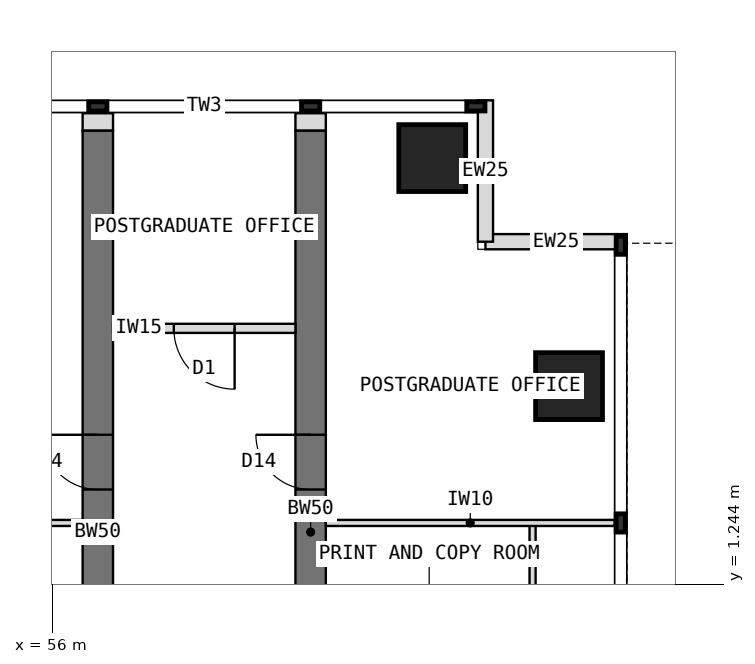
"""IFC4 building model, lengths in metres.
Left out: names, types, materials, properties, quantities, classifications, styles, units other than length and angle.
Written with IfcOpenShell. Run it as: python <this file> out.ifc"""

import sys

from ifc_helpers import new_model, si_unit, direction, frame, frame_2d, origin, origin_2d, place, context, subcontext, project, spatial, rectangle, extrude, element, fill, save


model = new_model("IFC4")
c1 = context("Model", 3, precision=1e-05, world=origin(), true_north=direction((0.0, 1.0)))
c2 = subcontext(c1, "Body", "Model", "MODEL_VIEW")
j1 = project(units=[si_unit("LENGTHUNIT", "METRE"), si_unit("PLANEANGLEUNIT", "RADIAN")], contexts=[c1])
p1 = place(None, origin())
s1 = spatial("IfcSite", under=j1, at=p1, CompositionType="ELEMENT")
p2 = place(p1, origin())
s2 = spatial("IfcBuilding", under=s1, at=p2, CompositionType="ELEMENT")
p3 = place(p2, frame((0.0, 0.0, 234.5)))
s3 = spatial("IfcBuildingStorey", under=s2, at=p3, CompositionType="ELEMENT", Elevation=234.5)
p4 = place(p3, frame((56.75, -4.5, 0.0), z_axis=(0.0, 0.0, 1.0), x_axis=(0.0, 1.0, 0.0)))
e1 = element("IfcWall", 1, at=p4, inside=s3, PredefinedType="SHEAR", context=c2, shape_type="SweptSolid", body=[
    extrude(rectangle(XDim=13.2, YDim=0.5, at=frame_2d((6.6, 0.0))), origin(), (0.0, 0.0, 1.0), 4.0),
])
p5 = place(p4, frame((0.55, 0.0, 0.0)))
e2 = element("IfcOpeningElement", 2, at=p5, cuts=e1, PredefinedType="OPENING", context=c2, shape_type="SweptSolid", body=[
    extrude(rectangle(XDim=0.9, YDim=2.1, at=frame_2d((0.45, 1.05))), frame((0.0, 0.26, 0.0), z_axis=(0.0, -1.0, 0.0), x_axis=(1.0, 0.0, 0.0)), (0.0, 0.0, 1.0), 0.52),
])
p6 = place(p4, frame((2.8, 0.0, 0.0)))
e3 = element("IfcOpeningElement", 3, at=p6, cuts=e1, PredefinedType="OPENING", context=c2, shape_type="SweptSolid", body=[
    extrude(rectangle(XDim=0.9, YDim=2.1, at=frame_2d((0.45, 1.05))), frame((0.0, 0.26, 0.0), z_axis=(0.0, -1.0, 0.0), x_axis=(1.0, 0.0, 0.0)), (0.0, 0.0, 1.0), 0.52),
])
p7 = place(p4, frame((7.3, 0.0, 0.0)))
e4 = element("IfcOpeningElement", 4, at=p7, cuts=e1, PredefinedType="OPENING", context=c2, shape_type="SweptSolid", body=[
    extrude(rectangle(XDim=0.9, YDim=2.1, at=frame_2d((0.45, 1.05))), frame((0.0, 0.26, 0.0), z_axis=(0.0, -1.0, 0.0), x_axis=(1.0, 0.0, 0.0)), (0.0, 0.0, 1.0), 0.52),
])
p8 = place(p3, frame((60.25, -4.5, 0.0), z_axis=(0.0, 0.0, 1.0), x_axis=(0.0, 1.0, 0.0)))
e5 = element("IfcWall", 5, at=p8, inside=s3, PredefinedType="SHEAR", context=c2, shape_type="SweptSolid", body=[
    extrude(rectangle(XDim=13.2, YDim=0.5, at=frame_2d((6.6, 0.0))), origin(), (0.0, 0.0, 1.0), 4.0),
])
p9 = place(p8, frame((0.55, 0.0, 0.0)))
e6 = element("IfcOpeningElement", 6, at=p9, cuts=e5, PredefinedType="OPENING", context=c2, shape_type="SweptSolid", body=[
    extrude(rectangle(XDim=0.9, YDim=2.1, at=frame_2d((0.45, 1.05))), frame((0.0, 0.26, 0.0), z_axis=(0.0, -1.0, 0.0), x_axis=(1.0, 0.0, 0.0)), (0.0, 0.0, 1.0), 0.52),
])
p10 = place(p8, frame((2.8, 0.0, 0.0)))
e7 = element("IfcOpeningElement", 7, at=p10, cuts=e5, PredefinedType="OPENING", context=c2, shape_type="SweptSolid", body=[
    extrude(rectangle(XDim=0.9, YDim=2.1, at=frame_2d((0.45, 1.05))), frame((0.0, 0.26, 0.0), z_axis=(0.0, -1.0, 0.0), x_axis=(1.0, 0.0, 0.0)), (0.0, 0.0, 1.0), 0.52),
])
p11 = place(p8, frame((7.3, 0.0, 0.0)))
e8 = element("IfcOpeningElement", 8, at=p11, cuts=e5, PredefinedType="OPENING", context=c2, shape_type="SweptSolid", body=[
    extrude(rectangle(XDim=0.9, YDim=2.1, at=frame_2d((0.45, 1.05))), frame((0.0, 0.26, 0.0), z_axis=(0.0, -1.0, 0.0), x_axis=(1.0, 0.0, 0.0)), (0.0, 0.0, 1.0), 0.52),
])
for number, where, z_axis, x_axis in (
    (9, (64.5, 4.5, 0.0), (0.0, 0.0, 1.0), (1.0, 0.0, 0.0)),
    (10, (62.25, 8.25, 0.0), (0.0, 0.0, 1.0), (1.0, 0.0, 0.0)),
):
    element("IfcColumn", number, at=place(p3, frame(where, z_axis=z_axis, x_axis=x_axis)), inside=s3, PredefinedType="COLUMN", context=c2, shape_type="SweptSolid", body=[
        extrude(rectangle(XDim=1.1, YDim=1.1, at=origin_2d()), origin(), (0.0, 0.0, 1.0), 4.0),
    ])
for number, where, z_axis, x_axis in (
    (11, (65.45, 6.875, 0.0), (0.0, 0.0, 1.0), (-1.0, 0.0, 0.0)),
    (12, (63.125, 6.875, 0.0), (0.0, 0.0, 1.0), (0.0, 1.0, 0.0)),
):
    element("IfcWall", number, at=place(p3, frame(where, z_axis=z_axis, x_axis=x_axis)), inside=s3, PredefinedType="STANDARD", context=c2, shape_type="SweptSolid", body=[
        extrude(rectangle(XDim=2.325, YDim=0.25, at=frame_2d((1.163, 0.0))), origin(), (0.0, 0.0, 1.0), 3.7),
    ])
for number, where, z_axis, x_axis in (
    (13, (56.75, 8.7, 0.0), (0.0, 0.0, 1.0), (0.0, 1.0, 0.0)),
    (14, (60.25, 8.7, 0.0), (0.0, 0.0, 1.0), (0.0, 1.0, 0.0)),
):
    element("IfcWall", number, at=place(p3, frame(where, z_axis=z_axis, x_axis=x_axis)), inside=s3, PredefinedType="PARTITIONING", context=c2, shape_type="SweptSolid", body=[
        extrude(rectangle(XDim=0.288, YDim=0.5, at=frame_2d((0.144, 0.0))), origin(), (0.0, 0.0, 1.0), 3.7),
    ])
for number, where, z_axis, x_axis in (
    (15, (56.5, 2.25, 0.0), (0.0, 0.0, 1.0), (-1.0, 0.0, 0.0)),
    (16, (60.5, 2.25, 0.0), (0.0, 0.0, 1.0), (1.0, 0.0, 0.0)),
):
    element("IfcWall", number, at=place(p3, frame(where, z_axis=z_axis, x_axis=x_axis)), inside=s3, PredefinedType="PARTITIONING", context=c2, shape_type="SweptSolid", body=[
        extrude(rectangle(XDim=4.75, YDim=0.1, at=frame_2d((2.375, 0.0))), origin(), (0.0, 0.0, 1.0), 3.7),
    ])
p12 = place(p3, frame((63.9, -0.15, 0.0), z_axis=(0.0, 0.0, 1.0), x_axis=(0.0, 1.0, 0.0)))
e17 = element("IfcWall", 17, at=p12, inside=s3, PredefinedType="PARTITIONING", context=c2, shape_type="SweptSolid", body=[
    extrude(rectangle(XDim=2.4, YDim=0.1, at=frame_2d((1.2, 0.0))), origin(), (0.0, 0.0, 1.0), 3.7),
])
p13 = place(p3, frame((60.0, 5.45, 0.0), z_axis=(0.0, 0.0, 1.0), x_axis=(-1.0, 0.0, 0.0)))
e18 = element("IfcWall", 18, at=p13, inside=s3, PredefinedType="PARTITIONING", context=c2, shape_type="SweptSolid", body=[
    extrude(rectangle(XDim=3.0, YDim=0.15, at=frame_2d((1.5, 0.0))), origin(), (0.0, 0.0, 1.0), 3.7),
])
p14 = place(p13, frame((1.0, 0.0, 0.0)))
e19 = element("IfcOpeningElement", 19, at=p14, cuts=e18, PredefinedType="OPENING", context=c2, shape_type="SweptSolid", body=[
    extrude(rectangle(XDim=1.0, YDim=2.1, at=frame_2d((0.5, 1.05))), frame((0.0, 0.085, 0.0), z_axis=(0.0, -1.0, 0.0), x_axis=(1.0, 0.0, 0.0)), (0.0, 0.0, 1.0), 0.17),
])
p15 = place(p14, origin())
e20 = element("IfcDoor", 20, at=p15, inside=s3, OperationType="SINGLE_SWING_LEFT", PredefinedType="DOOR", context=c2, shape_type="SweptSolid", body=[
    extrude(rectangle(XDim=1.0, YDim=2.1, at=frame_2d((0.5, 1.05))), frame((0.0, 0.025, 0.0), z_axis=(0.0, -1.0, 0.0), x_axis=(1.0, 0.0, 0.0)), (0.0, 0.0, 1.0), 0.05),
])
fill(e19, e20)
p16 = place(p7, origin())
e21 = element("IfcDoor", 21, at=p16, inside=s3, OperationType="SINGLE_SWING_RIGHT", PredefinedType="DOOR", context=c2, shape_type="SweptSolid", body=[
    extrude(rectangle(XDim=0.9, YDim=2.1, at=frame_2d((0.45, 1.05))), frame((0.0, 0.025, 0.0), z_axis=(0.0, -1.0, 0.0), x_axis=(1.0, 0.0, 0.0)), (0.0, 0.0, 1.0), 0.05),
])
fill(e4, e21)
p17 = place(p11, origin())
e22 = element("IfcDoor", 22, at=p17, inside=s3, OperationType="SINGLE_SWING_RIGHT", PredefinedType="DOOR", context=c2, shape_type="SweptSolid", body=[
    extrude(rectangle(XDim=0.9, YDim=2.1, at=frame_2d((0.45, 1.05))), frame((0.0, 0.025, 0.0), z_axis=(0.0, -1.0, 0.0), x_axis=(1.0, 0.0, 0.0)), (0.0, 0.0, 1.0), 0.05),
])
fill(e8, e22)
save(model, sys.argv[1])
